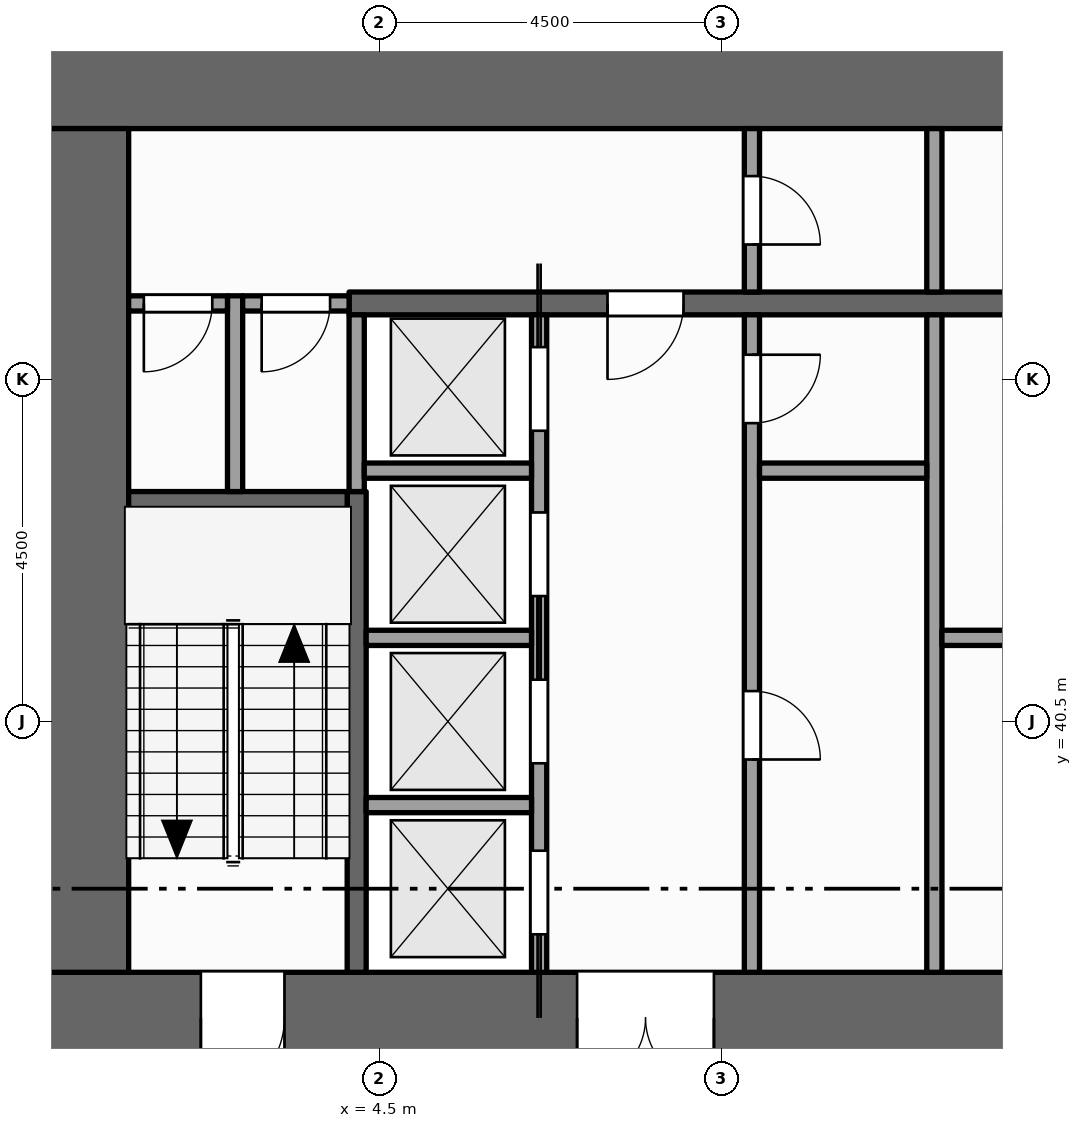
"""IFC4 building model, lengths in metres.
Left out: names, types, materials, properties, quantities, classifications, styles, units other than length and angle.
Written with IfcOpenShell. Run it as: python <this file> out.ifc"""

import sys

from ifc_helpers import new_model, si_unit, direction, frame, frame_2d, origin, place, context, subcontext, project, spatial, rectangle, extrude, element, fill, save


model = new_model("IFC4")
c1 = context("Model", 3, precision=1e-05, world=origin(), true_north=direction((0.0, 1.0)))
c2 = subcontext(c1, "Body", "Model", "MODEL_VIEW")
j1 = project(units=[si_unit("LENGTHUNIT", "METRE"), si_unit("PLANEANGLEUNIT", "RADIAN")], contexts=[c1])
p1 = place(None, origin())
s1 = spatial("IfcSite", under=j1, at=p1, CompositionType="ELEMENT")
p2 = place(p1, origin())
s2 = spatial("IfcBuilding", under=s1, at=p2, CompositionType="ELEMENT")
p3 = place(p2, frame((0.0, 0.0, 73.0)))
s3 = spatial("IfcBuildingStorey", under=s2, at=p3, CompositionType="ELEMENT", Elevation=73.0)
p4 = place(p3, frame((0.0, 36.6, -0.15), z_axis=(0.0, 0.0, 1.0), x_axis=(1.0, 0.0, 0.0)))
e1 = element("IfcWall", 1, at=p4, inside=s3, PredefinedType="SHEAR", context=c2, shape_type="SweptSolid", body=[
    extrude(rectangle(XDim=22.5, YDim=1.2, at=frame_2d((11.25, 0.0))), origin(), (0.0, 0.0, 1.0), 4.0),
])
p5 = place(p4, frame((7.1, 0.0, 0.15)))
e2 = element("IfcOpeningElement", 2, at=p5, cuts=e1, PredefinedType="OPENING", context=c2, shape_type="SweptSolid", body=[
    extrude(rectangle(XDim=1.8, YDim=2.1, at=frame_2d((0.9, 1.05))), frame((0.0, 0.61, 0.0), z_axis=(0.0, -1.0, 0.0), x_axis=(1.0, 0.0, 0.0)), (0.0, 0.0, 1.0), 1.22),
])
p6 = place(p4, frame((13.15, 0.0, 0.15)))
e3 = element("IfcOpeningElement", 3, at=p6, cuts=e1, PredefinedType="OPENING", context=c2, shape_type="SweptSolid", body=[
    extrude(rectangle(XDim=1.1, YDim=2.1, at=frame_2d((0.55, 1.05))), frame((0.0, 0.61, 0.0), z_axis=(0.0, -1.0, 0.0), x_axis=(1.0, 0.0, 0.0)), (0.0, 0.0, 1.0), 1.22),
])
p7 = place(p4, frame((2.15, 0.0, 0.15)))
e4 = element("IfcOpeningElement", 4, at=p7, cuts=e1, PredefinedType="OPENING", context=c2, shape_type="SweptSolid", body=[
    extrude(rectangle(XDim=1.1, YDim=2.1, at=frame_2d((0.55, 1.05))), frame((0.0, 0.61, 0.0), z_axis=(0.0, -1.0, 0.0), x_axis=(1.0, 0.0, 0.0)), (0.0, 0.0, 1.0), 1.22),
])
p8 = place(p4, frame((19.35, 0.0, 0.15)))
e5 = element("IfcOpeningElement", 5, at=p8, cuts=e1, PredefinedType="OPENING", context=c2, shape_type="SweptSolid", body=[
    extrude(rectangle(XDim=1.1, YDim=2.1, at=frame_2d((0.55, 1.05))), frame((0.0, 0.61, 0.0), z_axis=(0.0, -1.0, 0.0), x_axis=(1.0, 0.0, 0.0)), (0.0, 0.0, 1.0), 1.22),
])
p9 = place(p3, frame((0.0, 48.9, -0.15), z_axis=(0.0, 0.0, 1.0), x_axis=(1.0, 0.0, 0.0)))
e6 = element("IfcWall", 6, at=p9, inside=s3, PredefinedType="SHEAR", context=c2, shape_type="SweptSolid", body=[
    extrude(rectangle(XDim=22.5, YDim=1.2, at=frame_2d((11.25, 0.0))), origin(), (0.0, 0.0, 1.0), 4.0),
])
p10 = place(p3, frame((0.6, 37.2, -0.15), z_axis=(0.0, 0.0, 1.0), x_axis=(0.0, 1.0, 0.0)))
e7 = element("IfcWall", 7, at=p10, inside=s3, PredefinedType="SHEAR", context=c2, shape_type="SweptSolid", body=[
    extrude(rectangle(XDim=11.1, YDim=1.2, at=frame_2d((5.55, 0.0))), origin(), (0.0, 0.0, 1.0), 4.0),
])
p11 = place(p3, frame((2.6, 43.525, 0.0), z_axis=(0.0, 0.0, 1.0), x_axis=(0.0, 1.0, 0.0)))
e8 = element("IfcWall", 8, at=p11, inside=s3, PredefinedType="PARTITIONING", context=c2, shape_type="SweptSolid", body=[
    extrude(rectangle(XDim=2.575, YDim=0.2, at=frame_2d((1.288, 0.0))), origin(), (0.0, 0.0, 1.0), 3.75),
])
p12 = place(p3, frame((4.2, 37.2, 0.0), z_axis=(0.0, 0.0, 1.0), x_axis=(0.0, 1.0, 0.0)))
e9 = element("IfcWall", 9, at=p12, inside=s3, PredefinedType="SHEAR", context=c2, shape_type="SweptSolid", body=[
    extrude(rectangle(XDim=6.325, YDim=0.25, at=frame_2d((3.163, 0.0))), origin(), (0.0, 0.0, 1.0), 3.75),
])
p13 = place(p3, frame((4.2, 43.525, 0.0), z_axis=(0.0, 0.0, 1.0), x_axis=(0.0, 1.0, 0.0)))
e10 = element("IfcWall", 10, at=p13, inside=s3, PredefinedType="SOLIDWALL", context=c2, shape_type="SweptSolid", body=[
    extrude(rectangle(XDim=2.325, YDim=0.2, at=frame_2d((1.163, 0.0))), origin(), (0.0, 0.0, 1.0), 3.75),
])
p14 = place(p3, frame((6.6, 37.2, 0.0), z_axis=(0.0, 0.0, 1.0), x_axis=(0.0, 1.0, 0.0)))
e11 = element("IfcWall", 11, at=p14, inside=s3, PredefinedType="SOLIDWALL", context=c2, shape_type="SweptSolid", body=[
    extrude(rectangle(XDim=8.65, YDim=0.2, at=frame_2d((4.325, 0.0))), origin(), (0.0, 0.0, 1.0), 3.75),
])
p15 = place(p14, frame((0.5, 0.0, 0.012)))
e12 = element("IfcOpeningElement", 12, at=p15, cuts=e11, PredefinedType="OPENING", context=c2, shape_type="SweptSolid", body=[
    extrude(rectangle(XDim=1.1, YDim=2.1, at=frame_2d((0.55, 1.05))), frame((0.0, 0.11, 0.0), z_axis=(0.0, -1.0, 0.0), x_axis=(1.0, 0.0, 0.0)), (0.0, 0.0, 1.0), 0.22),
])
p16 = place(p14, frame((2.75, 0.0, 0.012)))
e13 = element("IfcOpeningElement", 13, at=p16, cuts=e11, PredefinedType="OPENING", context=c2, shape_type="SweptSolid", body=[
    extrude(rectangle(XDim=1.1, YDim=2.1, at=frame_2d((0.55, 1.05))), frame((0.0, 0.11, 0.0), z_axis=(0.0, -1.0, 0.0), x_axis=(1.0, 0.0, 0.0)), (0.0, 0.0, 1.0), 0.22),
])
p17 = place(p14, frame((4.95, 0.0, 0.012)))
e14 = element("IfcOpeningElement", 14, at=p17, cuts=e11, PredefinedType="OPENING", context=c2, shape_type="SweptSolid", body=[
    extrude(rectangle(XDim=1.1, YDim=2.1, at=frame_2d((0.55, 1.05))), frame((0.0, 0.11, 0.0), z_axis=(0.0, -1.0, 0.0), x_axis=(1.0, 0.0, 0.0)), (0.0, 0.0, 1.0), 0.22),
])
p18 = place(p14, frame((7.125, 0.0, 0.012)))
e15 = element("IfcOpeningElement", 15, at=p18, cuts=e11, PredefinedType="OPENING", context=c2, shape_type="SweptSolid", body=[
    extrude(rectangle(XDim=1.1, YDim=2.1, at=frame_2d((0.55, 1.05))), frame((0.0, 0.11, 0.0), z_axis=(0.0, -1.0, 0.0), x_axis=(1.0, 0.0, 0.0)), (0.0, 0.0, 1.0), 0.22),
])
p19 = place(p3, frame((9.4, 37.2, 0.0), z_axis=(0.0, 0.0, 1.0), x_axis=(0.0, 1.0, 0.0)))
e16 = element("IfcWall", 16, at=p19, inside=s3, PredefinedType="PARTITIONING", context=c2, shape_type="SweptSolid", body=[
    extrude(rectangle(XDim=8.65, YDim=0.2, at=frame_2d((4.325, 0.0))), origin(), (0.0, 0.0, 1.0), 3.75),
])
p20 = place(p19, frame((2.8, 0.0, 0.0)))
e17 = element("IfcOpeningElement", 17, at=p20, cuts=e16, PredefinedType="OPENING", context=c2, shape_type="SweptSolid", body=[
    extrude(rectangle(XDim=0.9, YDim=2.1, at=frame_2d((0.45, 1.05))), frame((0.0, 0.11, 0.0), z_axis=(0.0, -1.0, 0.0), x_axis=(1.0, 0.0, 0.0)), (0.0, 0.0, 1.0), 0.22),
])
p21 = place(p19, frame((7.225, 0.0, 0.0)))
e18 = element("IfcOpeningElement", 18, at=p21, cuts=e16, PredefinedType="OPENING", context=c2, shape_type="SweptSolid", body=[
    extrude(rectangle(XDim=0.9, YDim=2.1, at=frame_2d((0.45, 1.05))), frame((0.0, 0.11, 0.0), z_axis=(0.0, -1.0, 0.0), x_axis=(1.0, 0.0, 0.0)), (0.0, 0.0, 1.0), 0.22),
])
p22 = place(p3, frame((9.4, 46.15, 0.0), z_axis=(0.0, 0.0, 1.0), x_axis=(0.0, 1.0, 0.0)))
e19 = element("IfcWall", 19, at=p22, inside=s3, PredefinedType="PARTITIONING", context=c2, shape_type="SweptSolid", body=[
    extrude(rectangle(XDim=2.15, YDim=0.2, at=frame_2d((1.075, 0.0))), origin(), (0.0, 0.0, 1.0), 3.75),
])
p23 = place(p22, frame((0.625, 0.0, 0.0)))
e20 = element("IfcOpeningElement", 20, at=p23, cuts=e19, PredefinedType="OPENING", context=c2, shape_type="SweptSolid", body=[
    extrude(rectangle(XDim=0.9, YDim=2.1, at=frame_2d((0.45, 1.05))), frame((0.0, 0.11, 0.0), z_axis=(0.0, -1.0, 0.0), x_axis=(1.0, 0.0, 0.0)), (0.0, 0.0, 1.0), 0.22),
])
p24 = place(p3, frame((11.8, 37.2, 0.0), z_axis=(0.0, 0.0, 1.0), x_axis=(0.0, 1.0, 0.0)))
e21 = element("IfcWall", 21, at=p24, inside=s3, PredefinedType="PARTITIONING", context=c2, shape_type="SweptSolid", body=[
    extrude(rectangle(XDim=8.65, YDim=0.2, at=frame_2d((4.325, 0.0))), origin(), (0.0, 0.0, 1.0), 3.75),
])
p25 = place(p3, frame((11.8, 46.15, 0.0), z_axis=(0.0, 0.0, 1.0), x_axis=(0.0, 1.0, 0.0)))
e22 = element("IfcWall", 22, at=p25, inside=s3, PredefinedType="PARTITIONING", context=c2, shape_type="SweptSolid", body=[
    extrude(rectangle(XDim=2.15, YDim=0.2, at=frame_2d((1.075, 0.0))), origin(), (0.0, 0.0, 1.0), 3.75),
])
for number, where, z_axis, x_axis in (
    (23, (4.325, 39.4, 0.0), (0.0, 0.0, 1.0), (1.0, 0.0, 0.0)),
    (24, (4.325, 41.6, 0.0), (0.0, 0.0, 1.0), (1.0, 0.0, 0.0)),
):
    element("IfcWall", number, at=place(p3, frame(where, z_axis=z_axis, x_axis=x_axis)), inside=s3, PredefinedType="SOLIDWALL", context=c2, shape_type="SweptSolid", body=[
        extrude(rectangle(XDim=2.175, YDim=0.2, at=frame_2d((1.087, 0.0))), origin(), (0.0, 0.0, 1.0), 3.75),
    ])
p26 = place(p3, frame((11.9, 41.6, 0.0), z_axis=(0.0, 0.0, 1.0), x_axis=(1.0, 0.0, 0.0)))
e25 = element("IfcWall", 25, at=p26, inside=s3, PredefinedType="PARTITIONING", context=c2, shape_type="SweptSolid", body=[
    extrude(rectangle(XDim=3.6, YDim=0.2, at=frame_2d((1.8, 0.0))), origin(), (0.0, 0.0, 1.0), 3.75),
])
p27 = place(p26, frame((1.3, 0.0, 0.0)))
e26 = element("IfcOpeningElement", 26, at=p27, cuts=e25, PredefinedType="OPENING", context=c2, shape_type="SweptSolid", body=[
    extrude(rectangle(XDim=1.0, YDim=2.1, at=frame_2d((0.5, 1.05))), frame((0.0, 0.11, 0.0), z_axis=(0.0, -1.0, 0.0), x_axis=(1.0, 0.0, 0.0)), (0.0, 0.0, 1.0), 0.22),
])
p28 = place(p3, frame((1.2, 43.4, 0.0), z_axis=(0.0, 0.0, 1.0), x_axis=(1.0, 0.0, 0.0)))
e27 = element("IfcWall", 27, at=p28, inside=s3, PredefinedType="SHEAR", context=c2, shape_type="SweptSolid", body=[
    extrude(rectangle(XDim=2.875, YDim=0.25, at=frame_2d((1.438, 0.0))), origin(), (0.0, 0.0, 1.0), 3.75),
])
p29 = place(p3, frame((4.3, 43.8, 0.0), z_axis=(0.0, 0.0, 1.0), x_axis=(1.0, 0.0, 0.0)))
e28 = element("IfcWall", 28, at=p29, inside=s3, PredefinedType="SOLIDWALL", context=c2, shape_type="SweptSolid", body=[
    extrude(rectangle(XDim=2.2, YDim=0.2, at=frame_2d((1.1, 0.0))), origin(), (0.0, 0.0, 1.0), 3.75),
])
p30 = place(p3, frame((9.5, 43.8, 0.0), z_axis=(0.0, 0.0, 1.0), x_axis=(1.0, 0.0, 0.0)))
e29 = element("IfcWall", 29, at=p30, inside=s3, PredefinedType="PARTITIONING", context=c2, shape_type="SweptSolid", body=[
    extrude(rectangle(XDim=2.2, YDim=0.2, at=frame_2d((1.1, 0.0))), origin(), (0.0, 0.0, 1.0), 3.75),
])
p31 = place(p3, frame((1.2, 46.0, 0.0), z_axis=(0.0, 0.0, 1.0), x_axis=(1.0, 0.0, 0.0)))
e30 = element("IfcWall", 30, at=p31, inside=s3, PredefinedType="PARTITIONING", context=c2, shape_type="SweptSolid", body=[
    extrude(rectangle(XDim=1.3, YDim=0.2, at=frame_2d((0.65, 0.0))), origin(), (0.0, 0.0, 1.0), 3.75),
])
p32 = place(p31, frame((0.2, 0.0, 0.0)))
e31 = element("IfcOpeningElement", 31, at=p32, cuts=e30, PredefinedType="OPENING", context=c2, shape_type="SweptSolid", body=[
    extrude(rectangle(XDim=0.9, YDim=2.1, at=frame_2d((0.45, 1.05))), frame((0.0, 0.11, 0.0), z_axis=(0.0, -1.0, 0.0), x_axis=(1.0, 0.0, 0.0)), (0.0, 0.0, 1.0), 0.22),
])
p33 = place(p3, frame((2.7, 46.0, 0.0), z_axis=(0.0, 0.0, 1.0), x_axis=(1.0, 0.0, 0.0)))
e32 = element("IfcWall", 32, at=p33, inside=s3, PredefinedType="PARTITIONING", context=c2, shape_type="SweptSolid", body=[
    extrude(rectangle(XDim=1.4, YDim=0.2, at=frame_2d((0.7, 0.0))), origin(), (0.0, 0.0, 1.0), 3.75),
])
p34 = place(p33, frame((0.25, 0.0, 0.0)))
e33 = element("IfcOpeningElement", 33, at=p34, cuts=e32, PredefinedType="OPENING", context=c2, shape_type="SweptSolid", body=[
    extrude(rectangle(XDim=0.9, YDim=2.1, at=frame_2d((0.45, 1.05))), frame((0.0, 0.11, 0.0), z_axis=(0.0, -1.0, 0.0), x_axis=(1.0, 0.0, 0.0)), (0.0, 0.0, 1.0), 0.22),
])
p35 = place(p3, frame((4.1, 46.0, 0.0), z_axis=(0.0, 0.0, 1.0), x_axis=(1.0, 0.0, 0.0)))
e34 = element("IfcWall", 34, at=p35, inside=s3, PredefinedType="SHEAR", context=c2, shape_type="SweptSolid", body=[
    extrude(rectangle(XDim=14.5, YDim=0.3, at=frame_2d((7.25, 0.0))), origin(), (0.0, 0.0, 1.0), 3.75),
])
p36 = place(p35, frame((3.4, 0.0, 0.0)))
e35 = element("IfcOpeningElement", 35, at=p36, cuts=e34, PredefinedType="OPENING", context=c2, shape_type="SweptSolid", body=[
    extrude(rectangle(XDim=1.0, YDim=2.1, at=frame_2d((0.5, 1.05))), frame((0.0, 0.16, 0.0), z_axis=(0.0, -1.0, 0.0), x_axis=(1.0, 0.0, 0.0)), (0.0, 0.0, 1.0), 0.32),
])
p37 = place(p35, frame((9.1, 0.0, 0.0)))
e36 = element("IfcOpeningElement", 36, at=p37, cuts=e34, PredefinedType="OPENING", context=c2, shape_type="SweptSolid", body=[
    extrude(rectangle(XDim=1.0, YDim=2.1, at=frame_2d((0.5, 1.05))), frame((0.0, 0.16, 0.0), z_axis=(0.0, -1.0, 0.0), x_axis=(1.0, 0.0, 0.0)), (0.0, 0.0, 1.0), 0.32),
])
p38 = place(p15, origin())
e37 = element("IfcDoor", 37, at=p38, inside=s3, OperationType="SLIDING_TO_LEFT", PredefinedType="DOOR", context=c2, shape_type="SweptSolid", body=[
    extrude(rectangle(XDim=1.1, YDim=2.1, at=frame_2d((0.55, 1.05))), frame((0.0, 0.025, 0.0), z_axis=(0.0, -1.0, 0.0), x_axis=(1.0, 0.0, 0.0)), (0.0, 0.0, 1.0), 0.05),
])
fill(e12, e37)
p39 = place(p16, origin())
e38 = element("IfcDoor", 38, at=p39, inside=s3, OperationType="SLIDING_TO_RIGHT", PredefinedType="DOOR", context=c2, shape_type="SweptSolid", body=[
    extrude(rectangle(XDim=1.1, YDim=2.1, at=frame_2d((0.55, 1.05))), frame((0.0, 0.025, 0.0), z_axis=(0.0, -1.0, 0.0), x_axis=(1.0, 0.0, 0.0)), (0.0, 0.0, 1.0), 0.05),
])
fill(e13, e38)
p40 = place(p17, origin())
e39 = element("IfcDoor", 39, at=p40, inside=s3, OperationType="SLIDING_TO_LEFT", PredefinedType="DOOR", context=c2, shape_type="SweptSolid", body=[
    extrude(rectangle(XDim=1.1, YDim=2.1, at=frame_2d((0.55, 1.05))), frame((0.0, 0.025, 0.0), z_axis=(0.0, -1.0, 0.0), x_axis=(1.0, 0.0, 0.0)), (0.0, 0.0, 1.0), 0.05),
])
fill(e14, e39)
p41 = place(p18, origin())
e40 = element("IfcDoor", 40, at=p41, inside=s3, OperationType="SLIDING_TO_RIGHT", PredefinedType="DOOR", context=c2, shape_type="SweptSolid", body=[
    extrude(rectangle(XDim=1.1, YDim=2.1, at=frame_2d((0.55, 1.05))), frame((0.0, 0.025, 0.0), z_axis=(0.0, -1.0, 0.0), x_axis=(1.0, 0.0, 0.0)), (0.0, 0.0, 1.0), 0.05),
])
fill(e15, e40)
p42 = place(p5, origin())
e41 = element("IfcDoor", 41, at=p42, inside=s3, OperationType="DOUBLE_DOOR_SINGLE_SWING", PredefinedType="DOOR", context=c2, shape_type="SweptSolid", body=[
    extrude(rectangle(XDim=1.8, YDim=2.1, at=frame_2d((0.9, 1.05))), frame((0.0, 0.025, 0.0), z_axis=(0.0, -1.0, 0.0), x_axis=(1.0, 0.0, 0.0)), (0.0, 0.0, 1.0), 0.05),
])
fill(e2, e41)
p43 = place(p36, origin())
e42 = element("IfcDoor", 42, at=p43, inside=s3, OperationType="SINGLE_SWING_LEFT", PredefinedType="DOOR", context=c2, shape_type="SweptSolid", body=[
    extrude(rectangle(XDim=1.0, YDim=2.1, at=frame_2d((0.5, 1.05))), frame((0.0, 0.025, 0.0), z_axis=(0.0, -1.0, 0.0), x_axis=(1.0, 0.0, 0.0)), (0.0, 0.0, 1.0), 0.05),
])
fill(e35, e42)
p44 = place(p23, origin())
e43 = element("IfcDoor", 43, at=p44, inside=s3, OperationType="SINGLE_SWING_LEFT", PredefinedType="DOOR", context=c2, shape_type="SweptSolid", body=[
    extrude(rectangle(XDim=0.9, YDim=2.1, at=frame_2d((0.45, 1.05))), frame((0.0, 0.025, 0.0), z_axis=(0.0, -1.0, 0.0), x_axis=(1.0, 0.0, 0.0)), (0.0, 0.0, 1.0), 0.05),
])
fill(e20, e43)
p45 = place(p7, origin())
e44 = element("IfcDoor", 44, at=p45, inside=s3, OperationType="SINGLE_SWING_LEFT", PredefinedType="DOOR", context=c2, shape_type="SweptSolid", body=[
    extrude(rectangle(XDim=1.1, YDim=2.1, at=frame_2d((0.55, 1.05))), frame((0.0, 0.025, 0.0), z_axis=(0.0, -1.0, 0.0), x_axis=(1.0, 0.0, 0.0)), (0.0, 0.0, 1.0), 0.05),
])
fill(e4, e44)
p46 = place(p32, origin())
e45 = element("IfcDoor", 45, at=p46, inside=s3, OperationType="SINGLE_SWING_LEFT", PredefinedType="DOOR", context=c2, shape_type="SweptSolid", body=[
    extrude(rectangle(XDim=0.9, YDim=2.1, at=frame_2d((0.45, 1.05))), frame((0.0, 0.025, 0.0), z_axis=(0.0, -1.0, 0.0), x_axis=(1.0, 0.0, 0.0)), (0.0, 0.0, 1.0), 0.05),
])
fill(e31, e45)
p47 = place(p34, origin())
e46 = element("IfcDoor", 46, at=p47, inside=s3, OperationType="SINGLE_SWING_LEFT", PredefinedType="DOOR", context=c2, shape_type="SweptSolid", body=[
    extrude(rectangle(XDim=0.9, YDim=2.1, at=frame_2d((0.45, 1.05))), frame((0.0, 0.025, 0.0), z_axis=(0.0, -1.0, 0.0), x_axis=(1.0, 0.0, 0.0)), (0.0, 0.0, 1.0), 0.05),
])
fill(e33, e46)
p48 = place(p20, origin())
e47 = element("IfcDoor", 47, at=p48, inside=s3, OperationType="SINGLE_SWING_LEFT", PredefinedType="DOOR", context=c2, shape_type="SweptSolid", body=[
    extrude(rectangle(XDim=0.9, YDim=2.1, at=frame_2d((0.45, 1.05))), frame((0.0, 0.025, 0.0), z_axis=(0.0, -1.0, 0.0), x_axis=(1.0, 0.0, 0.0)), (0.0, 0.0, 1.0), 0.05),
])
fill(e17, e47)
p49 = place(p21, origin())
e48 = element("IfcDoor", 48, at=p49, inside=s3, OperationType="SINGLE_SWING_RIGHT", PredefinedType="DOOR", context=c2, shape_type="SweptSolid", body=[
    extrude(rectangle(XDim=0.9, YDim=2.1, at=frame_2d((0.45, 1.05))), frame((0.0, 0.025, 0.0), z_axis=(0.0, -1.0, 0.0), x_axis=(1.0, 0.0, 0.0)), (0.0, 0.0, 1.0), 0.05),
])
fill(e18, e48)
save(model, sys.argv[1])
